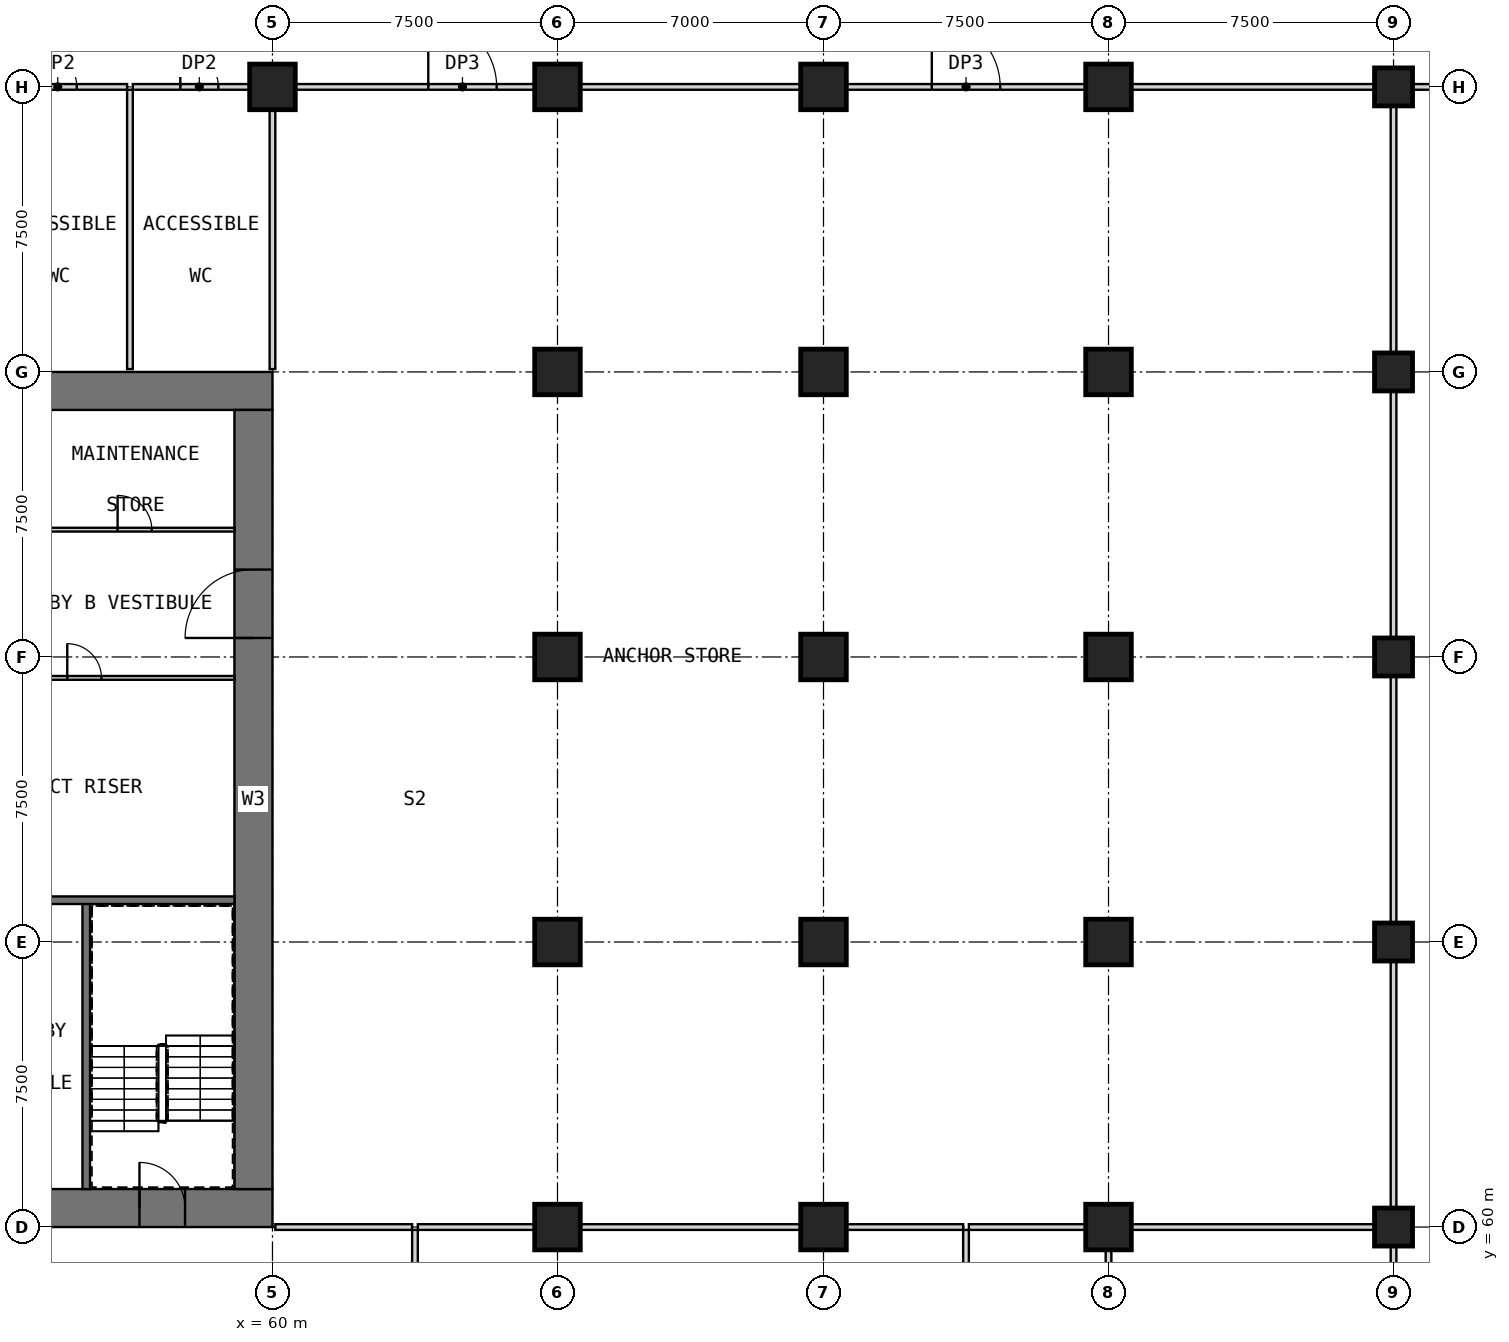
"""IFC4 building model, lengths in metres.
Left out: names, types, materials, properties, quantities, classifications, styles, units other than length and angle.
Written with IfcOpenShell. Run it as: python <this file> out.ifc"""

import sys

from ifc_helpers import new_model, si_unit, direction, frame, frame_2d, origin, origin_2d, place, context, subcontext, project, spatial, rectangle, extrude, element, fill, save


model = new_model("IFC4")
c1 = context("Model", 3, precision=1e-05, world=origin(), true_north=direction((0.0, 1.0)))
c2 = subcontext(c1, "Body", "Model", "MODEL_VIEW")
j1 = project(units=[si_unit("LENGTHUNIT", "METRE"), si_unit("PLANEANGLEUNIT", "RADIAN")], contexts=[c1])
p1 = place(None, origin())
s1 = spatial("IfcSite", under=j1, at=p1, CompositionType="ELEMENT")
p2 = place(p1, origin())
s2 = spatial("IfcBuilding", under=s1, at=p2, CompositionType="ELEMENT")
p3 = place(p2, frame((0.0, 0.0, 13.5)))
s3 = spatial("IfcBuildingStorey", under=s2, at=p3, CompositionType="ELEMENT", Elevation=13.5)
for number, where, z_axis, x_axis in (
    (1, (60.0, 90.0, 0.0), (0.0, 0.0, 1.0), (1.0, 0.0, 0.0)),
    (2, (67.5, 60.0, 0.0), (0.0, 0.0, 1.0), (1.0, 0.0, 0.0)),
    (3, (67.5, 67.5, 0.0), (0.0, 0.0, 1.0), (1.0, 0.0, 0.0)),
    (4, (67.5, 75.0, 0.0), (0.0, 0.0, 1.0), (1.0, 0.0, 0.0)),
    (5, (67.5, 82.5, 0.0), (0.0, 0.0, 1.0), (1.0, 0.0, 0.0)),
    (6, (67.5, 90.0, 0.0), (0.0, 0.0, 1.0), (1.0, 0.0, 0.0)),
    (7, (74.5, 60.0, 0.0), (0.0, 0.0, 1.0), (1.0, 0.0, 0.0)),
    (8, (74.5, 67.5, 0.0), (0.0, 0.0, 1.0), (1.0, 0.0, 0.0)),
    (9, (74.5, 75.0, 0.0), (0.0, 0.0, 1.0), (1.0, 0.0, 0.0)),
    (10, (74.5, 82.5, 0.0), (0.0, 0.0, 1.0), (1.0, 0.0, 0.0)),
    (11, (74.5, 90.0, 0.0), (0.0, 0.0, 1.0), (1.0, 0.0, 0.0)),
    (12, (82.0, 60.0, 0.0), (0.0, 0.0, 1.0), (1.0, 0.0, 0.0)),
    (13, (82.0, 67.5, 0.0), (0.0, 0.0, 1.0), (1.0, 0.0, 0.0)),
    (14, (82.0, 75.0, 0.0), (0.0, 0.0, 1.0), (1.0, 0.0, 0.0)),
    (15, (82.0, 82.5, 0.0), (0.0, 0.0, 1.0), (1.0, 0.0, 0.0)),
    (16, (82.0, 90.0, 0.0), (0.0, 0.0, 1.0), (1.0, 0.0, 0.0)),
):
    element("IfcColumn", number, at=place(p3, frame(where, z_axis=z_axis, x_axis=x_axis)), inside=s3, PredefinedType="COLUMN", context=c2, shape_type="SweptSolid", body=[
        extrude(rectangle(XDim=1.2, YDim=1.2, at=origin_2d()), origin(), (0.0, 0.0, 1.0), 5.0),
    ])
for number, where, z_axis, x_axis in (
    (17, (89.5, 60.0, 0.0), (0.0, 0.0, 1.0), (1.0, 0.0, 0.0)),
    (18, (89.5, 67.5, 0.0), (0.0, 0.0, 1.0), (1.0, 0.0, 0.0)),
    (19, (89.5, 75.0, 0.0), (0.0, 0.0, 1.0), (1.0, 0.0, 0.0)),
    (20, (89.5, 82.5, 0.0), (0.0, 0.0, 1.0), (1.0, 0.0, 0.0)),
    (21, (89.5, 90.0, 0.0), (0.0, 0.0, 1.0), (1.0, 0.0, 0.0)),
):
    element("IfcColumn", number, at=place(p3, frame(where, z_axis=z_axis, x_axis=x_axis)), inside=s3, PredefinedType="COLUMN", context=c2, shape_type="SweptSolid", body=[
        extrude(rectangle(XDim=1.0, YDim=1.0, at=origin_2d()), origin(), (0.0, 0.0, 1.0), 5.0),
    ])
p4 = place(p3, frame((30.0, 60.5, 0.0), z_axis=(0.0, 0.0, 1.0), x_axis=(1.0, 0.0, 0.0)))
e22 = element("IfcWall", 22, at=p4, inside=s3, PredefinedType="SHEAR", context=c2, shape_type="SweptSolid", body=[
    extrude(rectangle(XDim=30.0, YDim=1.0, at=frame_2d((15.0, 0.0))), origin(), (0.0, 0.0, 1.0), 5.0),
])
p5 = place(p4, frame((21.9, 0.0, 0.0)))
e23 = element("IfcOpeningElement", 23, at=p5, cuts=e22, PredefinedType="OPENING", context=c2, shape_type="SweptSolid", body=[
    extrude(rectangle(XDim=1.8, YDim=2.1, at=frame_2d((0.9, 1.05))), frame((0.0, 0.51, 0.0), z_axis=(0.0, -1.0, 0.0), x_axis=(1.0, 0.0, 0.0)), (0.0, 0.0, 1.0), 1.02),
])
p6 = place(p4, frame((26.5, 0.0, 0.0)))
e24 = element("IfcOpeningElement", 24, at=p6, cuts=e22, PredefinedType="OPENING", context=c2, shape_type="SweptSolid", body=[
    extrude(rectangle(XDim=1.2, YDim=2.1, at=frame_2d((0.6, 1.05))), frame((0.0, 0.51, 0.0), z_axis=(0.0, -1.0, 0.0), x_axis=(1.0, 0.0, 0.0)), (0.0, 0.0, 1.0), 1.02),
])
p7 = place(p3, frame((30.0, 82.0, 0.0), z_axis=(0.0, 0.0, 1.0), x_axis=(1.0, 0.0, 0.0)))
e25 = element("IfcWall", 25, at=p7, inside=s3, PredefinedType="SHEAR", context=c2, shape_type="SweptSolid", body=[
    extrude(rectangle(XDim=30.0, YDim=1.0, at=frame_2d((15.0, 0.0))), origin(), (0.0, 0.0, 1.0), 5.0),
])
p8 = place(p3, frame((59.5, 61.0, 0.0), z_axis=(0.0, 0.0, 1.0), x_axis=(0.0, 1.0, 0.0)))
e26 = element("IfcWall", 26, at=p8, inside=s3, PredefinedType="SHEAR", context=c2, shape_type="SweptSolid", body=[
    extrude(rectangle(XDim=20.5, YDim=1.0, at=frame_2d((10.25, 0.0))), origin(), (0.0, 0.0, 1.0), 5.0),
])
p9 = place(p8, frame((14.5, 0.0, 0.0)))
e27 = element("IfcOpeningElement", 27, at=p9, cuts=e26, PredefinedType="OPENING", context=c2, shape_type="SweptSolid", body=[
    extrude(rectangle(XDim=1.8, YDim=2.1, at=frame_2d((0.9, 1.05))), frame((0.0, 0.51, 0.0), z_axis=(0.0, -1.0, 0.0), x_axis=(1.0, 0.0, 0.0)), (0.0, 0.0, 1.0), 1.02),
])
p10 = place(p3, frame((55.1, 61.0, 0.0), z_axis=(0.0, 0.0, 1.0), x_axis=(0.0, 1.0, 0.0)))
e28 = element("IfcWall", 28, at=p10, inside=s3, PredefinedType="SOLIDWALL", context=c2, shape_type="SweptSolid", body=[
    extrude(rectangle(XDim=7.6, YDim=0.2, at=frame_2d((3.8, 0.0))), origin(), (0.0, 0.0, 1.0), 4.7),
])
p11 = place(p3, frame((51.1, 68.6, 0.0), z_axis=(0.0, 0.0, 1.0), x_axis=(1.0, 0.0, 0.0)))
e29 = element("IfcWall", 29, at=p11, inside=s3, PredefinedType="SOLIDWALL", context=c2, shape_type="SweptSolid", body=[
    extrude(rectangle(XDim=7.9, YDim=0.2, at=frame_2d((3.95, 0.0))), origin(), (0.0, 0.0, 1.0), 4.7),
])
p12 = place(p3, frame((51.1, 74.45, 0.0), z_axis=(0.0, 0.0, 1.0), x_axis=(1.0, 0.0, 0.0)))
e30 = element("IfcWall", 30, at=p12, inside=s3, PredefinedType="PARTITIONING", context=c2, shape_type="SweptSolid", body=[
    extrude(rectangle(XDim=7.9, YDim=0.1, at=frame_2d((3.95, 0.0))), origin(), (0.0, 0.0, 1.0), 4.7),
])
p13 = place(p12, frame((3.5, 0.0, 0.0)))
e31 = element("IfcOpeningElement", 31, at=p13, cuts=e30, PredefinedType="OPENING", context=c2, shape_type="SweptSolid", body=[
    extrude(rectangle(XDim=0.9, YDim=2.1, at=frame_2d((0.45, 1.05))), frame((0.0, 0.06, 0.0), z_axis=(0.0, -1.0, 0.0), x_axis=(1.0, 0.0, 0.0)), (0.0, 0.0, 1.0), 0.12),
])
p14 = place(p3, frame((51.1, 78.35, 0.0), z_axis=(0.0, 0.0, 1.0), x_axis=(1.0, 0.0, 0.0)))
e32 = element("IfcWall", 32, at=p14, inside=s3, PredefinedType="PARTITIONING", context=c2, shape_type="SweptSolid", body=[
    extrude(rectangle(XDim=7.9, YDim=0.1, at=frame_2d((3.95, 0.0))), origin(), (0.0, 0.0, 1.0), 4.7),
])
p15 = place(p14, frame((0.875, 0.0, 0.0)))
e33 = element("IfcOpeningElement", 33, at=p15, cuts=e32, PredefinedType="OPENING", context=c2, shape_type="SweptSolid", body=[
    extrude(rectangle(XDim=0.9, YDim=2.1, at=frame_2d((0.45, 1.05))), frame((0.0, 0.06, 0.0), z_axis=(0.0, -1.0, 0.0), x_axis=(1.0, 0.0, 0.0)), (0.0, 0.0, 1.0), 0.12),
])
p16 = place(p14, frame((4.825, 0.0, 0.0)))
e34 = element("IfcOpeningElement", 34, at=p16, cuts=e32, PredefinedType="OPENING", context=c2, shape_type="SweptSolid", body=[
    extrude(rectangle(XDim=0.9, YDim=2.1, at=frame_2d((0.45, 1.05))), frame((0.0, 0.06, 0.0), z_axis=(0.0, -1.0, 0.0), x_axis=(1.0, 0.0, 0.0)), (0.0, 0.0, 1.0), 0.12),
])
p17 = place(p3, frame((60.075, 60.0, 0.0), z_axis=(0.0, 0.0, 1.0), x_axis=(1.0, 0.0, 0.0)))
e35 = element("IfcWall", 35, at=p17, inside=s3, PredefinedType="PARTITIONING", context=c2, shape_type="SweptSolid", body=[
    extrude(rectangle(XDim=3.6, YDim=0.15, at=frame_2d((1.8, 0.0))), origin(), (0.0, 0.0, 1.0), 4.7),
])
p18 = place(p3, frame((63.825, 60.0, 0.0), z_axis=(0.0, 0.0, 1.0), x_axis=(1.0, 0.0, 0.0)))
e36 = element("IfcWall", 36, at=p18, inside=s3, PredefinedType="PARTITIONING", context=c2, shape_type="SweptSolid", body=[
    extrude(rectangle(XDim=3.075, YDim=0.15, at=frame_2d((1.538, 0.0))), origin(), (0.0, 0.0, 1.0), 4.7),
])
p19 = place(p3, frame((68.1, 60.0, 0.0), z_axis=(0.0, 0.0, 1.0), x_axis=(1.0, 0.0, 0.0)))
e37 = element("IfcWall", 37, at=p19, inside=s3, PredefinedType="PARTITIONING", context=c2, shape_type="SweptSolid", body=[
    extrude(rectangle(XDim=5.8, YDim=0.15, at=frame_2d((2.9, 0.0))), origin(), (0.0, 0.0, 1.0), 4.7),
])
for number, where, z_axis, x_axis in (
    (38, (75.1, 60.0, 0.0), (0.0, 0.0, 1.0), (1.0, 0.0, 0.0)),
    (39, (78.325, 60.0, 0.0), (0.0, 0.0, 1.0), (1.0, 0.0, 0.0)),
):
    element("IfcWall", number, at=place(p3, frame(where, z_axis=z_axis, x_axis=x_axis)), inside=s3, PredefinedType="PARTITIONING", context=c2, shape_type="SweptSolid", body=[
        extrude(rectangle(XDim=3.075, YDim=0.15, at=frame_2d((1.538, 0.0))), origin(), (0.0, 0.0, 1.0), 4.7),
    ])
p20 = place(p3, frame((82.6, 60.0, 0.0), z_axis=(0.0, 0.0, 1.0), x_axis=(1.0, 0.0, 0.0)))
e40 = element("IfcWall", 40, at=p20, inside=s3, PredefinedType="PARTITIONING", context=c2, shape_type="SweptSolid", body=[
    extrude(rectangle(XDim=6.4, YDim=0.15, at=frame_2d((3.2, 0.0))), origin(), (0.0, 0.0, 1.0), 4.7),
])
p21 = place(p3, frame((53.1, 90.0, 0.0), z_axis=(0.0, 0.0, 1.0), x_axis=(1.0, 0.0, 0.0)))
e41 = element("IfcWall", 41, at=p21, inside=s3, PredefinedType="PARTITIONING", context=c2, shape_type="SweptSolid", body=[
    extrude(rectangle(XDim=3.075, YDim=0.15, at=frame_2d((1.538, 0.0))), origin(), (0.0, 0.0, 1.0), 4.7),
])
p22 = place(p21, frame((0.75, 0.0, 0.0)))
e42 = element("IfcOpeningElement", 42, at=p22, cuts=e41, PredefinedType="OPENING", context=c2, shape_type="SweptSolid", body=[
    extrude(rectangle(XDim=1.0, YDim=2.1, at=frame_2d((0.5, 1.05))), frame((0.0, 0.085, 0.0), z_axis=(0.0, -1.0, 0.0), x_axis=(1.0, 0.0, 0.0)), (0.0, 0.0, 1.0), 0.17),
])
p23 = place(p3, frame((56.325, 90.0, 0.0), z_axis=(0.0, 0.0, 1.0), x_axis=(1.0, 0.0, 0.0)))
e43 = element("IfcWall", 43, at=p23, inside=s3, PredefinedType="PARTITIONING", context=c2, shape_type="SweptSolid", body=[
    extrude(rectangle(XDim=3.075, YDim=0.15, at=frame_2d((1.538, 0.0))), origin(), (0.0, 0.0, 1.0), 4.7),
])
p24 = place(p23, frame((1.25, 0.0, 0.0)))
e44 = element("IfcOpeningElement", 44, at=p24, cuts=e43, PredefinedType="OPENING", context=c2, shape_type="SweptSolid", body=[
    extrude(rectangle(XDim=1.0, YDim=2.1, at=frame_2d((0.5, 1.05))), frame((0.0, 0.085, 0.0), z_axis=(0.0, -1.0, 0.0), x_axis=(1.0, 0.0, 0.0)), (0.0, 0.0, 1.0), 0.17),
])
p25 = place(p3, frame((60.6, 90.0, 0.0), z_axis=(0.0, 0.0, 1.0), x_axis=(1.0, 0.0, 0.0)))
e45 = element("IfcWall", 45, at=p25, inside=s3, PredefinedType="PARTITIONING", context=c2, shape_type="SweptSolid", body=[
    extrude(rectangle(XDim=6.3, YDim=0.15, at=frame_2d((3.15, 0.0))), origin(), (0.0, 0.0, 1.0), 4.7),
])
p26 = place(p25, frame((3.5, 0.0, 0.0)))
e46 = element("IfcOpeningElement", 46, at=p26, cuts=e45, PredefinedType="OPENING", context=c2, shape_type="SweptSolid", body=[
    extrude(rectangle(XDim=1.8, YDim=2.4, at=frame_2d((0.9, 1.2))), frame((0.0, 0.085, 0.0), z_axis=(0.0, -1.0, 0.0), x_axis=(1.0, 0.0, 0.0)), (0.0, 0.0, 1.0), 0.17),
])
p27 = place(p3, frame((68.1, 90.0, 0.0), z_axis=(0.0, 0.0, 1.0), x_axis=(1.0, 0.0, 0.0)))
e47 = element("IfcWall", 47, at=p27, inside=s3, PredefinedType="PARTITIONING", context=c2, shape_type="SweptSolid", body=[
    extrude(rectangle(XDim=5.8, YDim=0.15, at=frame_2d((2.9, 0.0))), origin(), (0.0, 0.0, 1.0), 4.7),
])
p28 = place(p3, frame((75.1, 90.0, 0.0), z_axis=(0.0, 0.0, 1.0), x_axis=(1.0, 0.0, 0.0)))
e48 = element("IfcWall", 48, at=p28, inside=s3, PredefinedType="PARTITIONING", context=c2, shape_type="SweptSolid", body=[
    extrude(rectangle(XDim=6.3, YDim=0.15, at=frame_2d((3.15, 0.0))), origin(), (0.0, 0.0, 1.0), 4.7),
])
p29 = place(p28, frame((2.25, 0.0, 0.0)))
e49 = element("IfcOpeningElement", 49, at=p29, cuts=e48, PredefinedType="OPENING", context=c2, shape_type="SweptSolid", body=[
    extrude(rectangle(XDim=1.8, YDim=2.4, at=frame_2d((0.9, 1.2))), frame((0.0, 0.085, 0.0), z_axis=(0.0, -1.0, 0.0), x_axis=(1.0, 0.0, 0.0)), (0.0, 0.0, 1.0), 0.17),
])
for number, where, z_axis, x_axis in (
    (50, (82.6, 90.0, 0.0), (0.0, 0.0, 1.0), (1.0, 0.0, 0.0)),
    (51, (90.0, 90.0, 0.0), (0.0, 0.0, 1.0), (1.0, 0.0, 0.0)),
):
    element("IfcWall", number, at=place(p3, frame(where, z_axis=z_axis, x_axis=x_axis)), inside=s3, PredefinedType="PARTITIONING", context=c2, shape_type="SweptSolid", body=[
        extrude(rectangle(XDim=6.4, YDim=0.15, at=frame_2d((3.2, 0.0))), origin(), (0.0, 0.0, 1.0), 4.7),
    ])
for number, where, z_axis, x_axis in (
    (52, (56.25, 82.575, 0.0), (0.0, 0.0, 1.0), (0.0, 1.0, 0.0)),
    (53, (78.25, 52.575, 0.0), (0.0, 0.0, 1.0), (0.0, 1.0, 0.0)),
):
    element("IfcWall", number, at=place(p3, frame(where, z_axis=z_axis, x_axis=x_axis)), inside=s3, PredefinedType="PARTITIONING", context=c2, shape_type="SweptSolid", body=[
        extrude(rectangle(XDim=7.35, YDim=0.15, at=frame_2d((3.675, 0.0))), origin(), (0.0, 0.0, 1.0), 4.7),
    ])
for number, where, z_axis, x_axis in (
    (54, (89.5, 53.0, 0.0), (0.0, 0.0, 1.0), (0.0, 1.0, 0.0)),
    (55, (89.5, 60.5, 0.0), (0.0, 0.0, 1.0), (0.0, 1.0, 0.0)),
    (56, (89.5, 68.0, 0.0), (0.0, 0.0, 1.0), (0.0, 1.0, 0.0)),
    (57, (89.5, 75.5, 0.0), (0.0, 0.0, 1.0), (0.0, 1.0, 0.0)),
    (58, (89.5, 83.0, 0.0), (0.0, 0.0, 1.0), (0.0, 1.0, 0.0)),
):
    element("IfcWall", number, at=place(p3, frame(where, z_axis=z_axis, x_axis=x_axis)), inside=s3, PredefinedType="PARTITIONING", context=c2, shape_type="SweptSolid", body=[
        extrude(rectangle(XDim=6.5, YDim=0.15, at=frame_2d((3.25, 0.0))), origin(), (0.0, 0.0, 1.0), 4.7),
    ])
p30 = place(p3, frame((63.75, 52.575, 0.0), z_axis=(0.0, 0.0, 1.0), x_axis=(0.0, 1.0, 0.0)))
e59 = element("IfcWall", 59, at=p30, inside=s3, PredefinedType="PARTITIONING", context=c2, shape_type="SweptSolid", body=[
    extrude(rectangle(XDim=7.35, YDim=0.15, at=frame_2d((3.675, 0.0))), origin(), (0.0, 0.0, 1.0), 4.7),
])
p31 = place(p3, frame((82.0, 53.1, 0.0), z_axis=(0.0, 0.0, 1.0), x_axis=(0.0, 1.0, 0.0)))
e60 = element("IfcWall", 60, at=p31, inside=s3, PredefinedType="PARTITIONING", context=c2, shape_type="SweptSolid", body=[
    extrude(rectangle(XDim=6.3, YDim=0.15, at=frame_2d((3.15, 0.0))), origin(), (0.0, 0.0, 1.0), 4.7),
])
p32 = place(p3, frame((60.0, 82.575, 0.0), z_axis=(0.0, 0.0, 1.0), x_axis=(0.0, 1.0, 0.0)))
e61 = element("IfcWall", 61, at=p32, inside=s3, PredefinedType="PARTITIONING", context=c2, shape_type="SweptSolid", body=[
    extrude(rectangle(XDim=6.825, YDim=0.15, at=frame_2d((3.413, 0.0))), origin(), (0.0, 0.0, 1.0), 4.7),
])
p33 = place(p9, origin())
e62 = element("IfcDoor", 62, at=p33, inside=s3, OperationType="DOUBLE_DOOR_SINGLE_SWING", PredefinedType="DOOR", context=c2, shape_type="SweptSolid", body=[
    extrude(rectangle(XDim=1.8, YDim=2.1, at=frame_2d((0.9, 1.05))), frame((0.0, 0.025, 0.0), z_axis=(0.0, -1.0, 0.0), x_axis=(1.0, 0.0, 0.0)), (0.0, 0.0, 1.0), 0.05),
])
fill(e27, e62)
p34 = place(p6, origin())
e63 = element("IfcDoor", 63, at=p34, inside=s3, OperationType="SINGLE_SWING_LEFT", PredefinedType="DOOR", context=c2, shape_type="SweptSolid", body=[
    extrude(rectangle(XDim=1.2, YDim=2.1, at=frame_2d((0.6, 1.05))), frame((0.0, 0.025, 0.0), z_axis=(0.0, -1.0, 0.0), x_axis=(1.0, 0.0, 0.0)), (0.0, 0.0, 1.0), 0.05),
])
fill(e24, e63)
p35 = place(p13, origin())
e64 = element("IfcDoor", 64, at=p35, inside=s3, OperationType="SINGLE_SWING_RIGHT", PredefinedType="DOOR", context=c2, shape_type="SweptSolid", body=[
    extrude(rectangle(XDim=0.9, YDim=2.1, at=frame_2d((0.45, 1.05))), frame((0.0, 0.025, 0.0), z_axis=(0.0, -1.0, 0.0), x_axis=(1.0, 0.0, 0.0)), (0.0, 0.0, 1.0), 0.05),
])
fill(e31, e64)
p36 = place(p16, origin())
e65 = element("IfcDoor", 65, at=p36, inside=s3, OperationType="SINGLE_SWING_LEFT", PredefinedType="DOOR", context=c2, shape_type="SweptSolid", body=[
    extrude(rectangle(XDim=0.9, YDim=2.1, at=frame_2d((0.45, 1.05))), frame((0.0, 0.025, 0.0), z_axis=(0.0, -1.0, 0.0), x_axis=(1.0, 0.0, 0.0)), (0.0, 0.0, 1.0), 0.05),
])
fill(e34, e65)
p37 = place(p22, origin())
e66 = element("IfcDoor", 66, at=p37, inside=s3, OperationType="SINGLE_SWING_LEFT", PredefinedType="DOOR", context=c2, shape_type="SweptSolid", body=[
    extrude(rectangle(XDim=1.0, YDim=2.1, at=frame_2d((0.5, 1.05))), frame((0.0, 0.025, 0.0), z_axis=(0.0, -1.0, 0.0), x_axis=(1.0, 0.0, 0.0)), (0.0, 0.0, 1.0), 0.05),
])
fill(e42, e66)
p38 = place(p24, origin())
e67 = element("IfcDoor", 67, at=p38, inside=s3, OperationType="SINGLE_SWING_LEFT", PredefinedType="DOOR", context=c2, shape_type="SweptSolid", body=[
    extrude(rectangle(XDim=1.0, YDim=2.1, at=frame_2d((0.5, 1.05))), frame((0.0, 0.025, 0.0), z_axis=(0.0, -1.0, 0.0), x_axis=(1.0, 0.0, 0.0)), (0.0, 0.0, 1.0), 0.05),
])
fill(e44, e67)
p39 = place(p26, origin())
e68 = element("IfcDoor", 68, at=p39, inside=s3, OperationType="SINGLE_SWING_LEFT", PredefinedType="DOOR", context=c2, shape_type="SweptSolid", body=[
    extrude(rectangle(XDim=1.8, YDim=2.4, at=frame_2d((0.9, 1.2))), frame((0.0, 0.025, 0.0), z_axis=(0.0, -1.0, 0.0), x_axis=(1.0, 0.0, 0.0)), (0.0, 0.0, 1.0), 0.05),
])
fill(e46, e68)
p40 = place(p29, origin())
e69 = element("IfcDoor", 69, at=p40, inside=s3, OperationType="SINGLE_SWING_LEFT", PredefinedType="DOOR", context=c2, shape_type="SweptSolid", body=[
    extrude(rectangle(XDim=1.8, YDim=2.4, at=frame_2d((0.9, 1.2))), frame((0.0, 0.025, 0.0), z_axis=(0.0, -1.0, 0.0), x_axis=(1.0, 0.0, 0.0)), (0.0, 0.0, 1.0), 0.05),
])
fill(e49, e69)
save(model, sys.argv[1])
